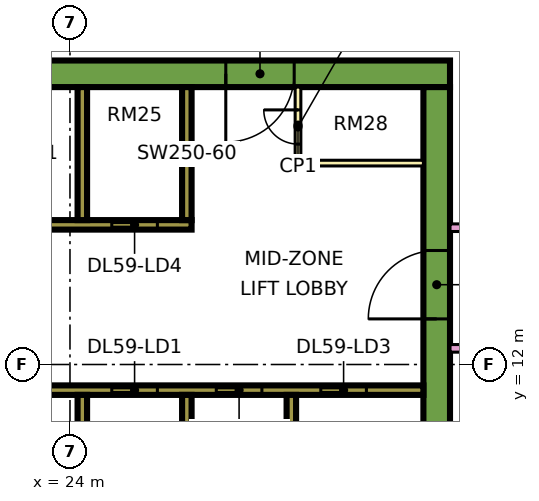
"""IFC4 building model, lengths in metres.
Left out: names, types, materials, properties, quantities, classifications, styles, units other than length and angle.
Written with IfcOpenShell. Run it as: python <this file> out.ifc"""

import sys

from ifc_helpers import new_model, si_unit, direction, frame, frame_2d, origin, place, context, subcontext, project, spatial, rectangle, extrude, element, fill, save


model = new_model("IFC4")
c1 = context("Model", 3, precision=1e-05, world=origin(), true_north=direction((0.0, 1.0)))
c2 = subcontext(c1, "Body", "Model", "MODEL_VIEW")
j1 = project(units=[si_unit("LENGTHUNIT", "METRE"), si_unit("PLANEANGLEUNIT", "RADIAN")], contexts=[c1])
p1 = place(None, origin())
s1 = spatial("IfcSite", under=j1, at=p1, CompositionType="ELEMENT")
p2 = place(p1, origin())
s2 = spatial("IfcBuilding", under=s1, at=p2, CompositionType="ELEMENT")
p3 = place(p2, frame((0.0, 0.0, 249.15)))
s3 = spatial("IfcBuildingStorey", under=s2, at=p3, CompositionType="ELEMENT", Elevation=249.15)
p4 = place(p3, frame((9.0, 19.65, 0.0), z_axis=(0.0, 0.0, 1.0), x_axis=(1.0, 0.0, 0.0)))
e1 = element("IfcWall", 1, at=p4, inside=s3, PredefinedType="SHEAR", context=c2, shape_type="SweptSolid", body=[
    extrude(rectangle(XDim=25.0, YDim=0.7, at=frame_2d((12.5, 0.0))), origin(), (0.0, 0.0, 1.0), 3.75),
])
p5 = place(p4, frame((19.1, 0.0, 0.0)))
e2 = element("IfcOpeningElement", 2, at=p5, cuts=e1, PredefinedType="OPENING", context=c2, shape_type="SweptSolid", body=[
    extrude(rectangle(XDim=1.8, YDim=2.4, at=frame_2d((0.9, 1.2))), frame((0.0, 0.36, 0.0), z_axis=(0.0, -1.0, 0.0), x_axis=(1.0, 0.0, 0.0)), (0.0, 0.0, 1.0), 0.72),
])
p6 = place(p3, frame((33.65, 7.7, 0.0), z_axis=(0.0, 0.0, 1.0), x_axis=(0.0, 1.0, 0.0)))
e3 = element("IfcWall", 3, at=p6, inside=s3, PredefinedType="SHEAR", context=c2, shape_type="SweptSolid", body=[
    extrude(rectangle(XDim=11.6, YDim=0.7, at=frame_2d((5.8, 0.0))), origin(), (0.0, 0.0, 1.0), 3.75),
])
p7 = place(p6, frame((5.5, 0.0, 0.0)))
e4 = element("IfcOpeningElement", 4, at=p7, cuts=e3, PredefinedType="OPENING", context=c2, shape_type="SweptSolid", body=[
    extrude(rectangle(XDim=1.8, YDim=2.4, at=frame_2d((0.9, 1.2))), frame((0.0, 0.36, 0.0), z_axis=(0.0, -1.0, 0.0), x_axis=(1.0, 0.0, 0.0)), (0.0, 0.0, 1.0), 0.72),
])
p8 = place(p3, frame((13.45, 11.325, 0.0), z_axis=(0.0, 0.0, 1.0), x_axis=(1.0, 0.0, 0.0)))
e5 = element("IfcWall", 5, at=p8, inside=s3, PredefinedType="SHEAR", context=c2, shape_type="SweptSolid", body=[
    extrude(rectangle(XDim=19.85, YDim=0.25, at=frame_2d((9.925, 0.0))), origin(), (0.0, 0.0, 1.0), 3.75),
])
p9 = place(p8, frame((11.65, 0.0, 0.0)))
e6 = element("IfcOpeningElement", 6, at=p9, cuts=e5, PredefinedType="OPENING", context=c2, shape_type="SweptSolid", body=[
    extrude(rectangle(XDim=1.2, YDim=2.2, at=frame_2d((0.6, 1.1))), frame((0.0, 0.135, 0.0), z_axis=(0.0, -1.0, 0.0), x_axis=(1.0, 0.0, 0.0)), (0.0, 0.0, 1.0), 0.27),
])
p10 = place(p8, frame((14.4, 0.0, 0.0)))
e7 = element("IfcOpeningElement", 7, at=p10, cuts=e5, PredefinedType="OPENING", context=c2, shape_type="SweptSolid", body=[
    extrude(rectangle(XDim=1.2, YDim=2.2, at=frame_2d((0.6, 1.1))), frame((0.0, 0.135, 0.0), z_axis=(0.0, -1.0, 0.0), x_axis=(1.0, 0.0, 0.0)), (0.0, 0.0, 1.0), 0.27),
])
p11 = place(p8, frame((17.15, 0.0, 0.0)))
e8 = element("IfcOpeningElement", 8, at=p11, cuts=e5, PredefinedType="OPENING", context=c2, shape_type="SweptSolid", body=[
    extrude(rectangle(XDim=1.2, YDim=2.2, at=frame_2d((0.6, 1.1))), frame((0.0, 0.135, 0.0), z_axis=(0.0, -1.0, 0.0), x_axis=(1.0, 0.0, 0.0)), (0.0, 0.0, 1.0), 0.27),
])
p12 = place(p8, frame((2.8, 0.0, 0.0)))
e9 = element("IfcOpeningElement", 9, at=p12, cuts=e5, PredefinedType="OPENING", context=c2, shape_type="SweptSolid", body=[
    extrude(rectangle(XDim=0.9, YDim=2.1, at=frame_2d((0.45, 1.05))), frame((0.0, 0.135, 0.0), z_axis=(0.0, -1.0, 0.0), x_axis=(1.0, 0.0, 0.0)), (0.0, 0.0, 1.0), 0.27),
])
p13 = place(p8, frame((8.175, 0.0, 0.0)))
e10 = element("IfcOpeningElement", 10, at=p13, cuts=e5, PredefinedType="OPENING", context=c2, shape_type="SweptSolid", body=[
    extrude(rectangle(XDim=0.9, YDim=2.1, at=frame_2d((0.45, 1.05))), frame((0.0, 0.135, 0.0), z_axis=(0.0, -1.0, 0.0), x_axis=(1.0, 0.0, 0.0)), (0.0, 0.0, 1.0), 0.27),
])
p14 = place(p3, frame((13.45, 15.675, 0.0), z_axis=(0.0, 0.0, 1.0), x_axis=(1.0, 0.0, 0.0)))
e11 = element("IfcWall", 11, at=p14, inside=s3, PredefinedType="SHEAR", context=c2, shape_type="SweptSolid", body=[
    extrude(rectangle(XDim=13.75, YDim=0.25, at=frame_2d((6.875, 0.0))), origin(), (0.0, 0.0, 1.0), 3.75),
])
p15 = place(p14, frame((11.65, 0.0, 0.0)))
e12 = element("IfcOpeningElement", 12, at=p15, cuts=e11, PredefinedType="OPENING", context=c2, shape_type="SweptSolid", body=[
    extrude(rectangle(XDim=1.2, YDim=2.2, at=frame_2d((0.6, 1.1))), frame((0.0, 0.135, 0.0), z_axis=(0.0, -1.0, 0.0), x_axis=(1.0, 0.0, 0.0)), (0.0, 0.0, 1.0), 0.27),
])
for number, where, z_axis, x_axis in (
    (13, (24.325, 7.7, 0.0), (0.0, 0.0, 1.0), (0.0, 1.0, 0.0)),
    (14, (27.075, 7.7, 0.0), (0.0, 0.0, 1.0), (0.0, 1.0, 0.0)),
    (15, (29.825, 7.7, 0.0), (0.0, 0.0, 1.0), (0.0, 1.0, 0.0)),
    (16, (24.325, 15.8, 0.0), (0.0, 0.0, 1.0), (0.0, 1.0, 0.0)),
    (17, (27.075, 15.8, 0.0), (0.0, 0.0, 1.0), (0.0, 1.0, 0.0)),
):
    element("IfcWall", number, at=place(p3, frame(where, z_axis=z_axis, x_axis=x_axis)), inside=s3, PredefinedType="SHEAR", context=c2, shape_type="SweptSolid", body=[
        extrude(rectangle(XDim=3.5, YDim=0.25, at=frame_2d((1.75, 0.0))), origin(), (0.0, 0.0, 1.0), 3.75),
    ])
p16 = place(p3, frame((30.0, 17.3, 0.0), z_axis=(0.0, 0.0, 1.0), x_axis=(0.0, 1.0, 0.0)))
e18 = element("IfcWall", 18, at=p16, inside=s3, PredefinedType="PARTITIONING", context=c2, shape_type="SweptSolid", body=[
    extrude(rectangle(XDim=2.0, YDim=0.15, at=frame_2d((1.0, 0.0))), origin(), (0.0, 0.0, 1.0), 3.35),
])
p17 = place(p16, frame((0.5, 0.0, 0.0)))
e19 = element("IfcOpeningElement", 19, at=p17, cuts=e18, PredefinedType="OPENING", context=c2, shape_type="SweptSolid", body=[
    extrude(rectangle(XDim=0.9, YDim=2.1, at=frame_2d((0.45, 1.05))), frame((0.0, 0.085, 0.0), z_axis=(0.0, -1.0, 0.0), x_axis=(1.0, 0.0, 0.0)), (0.0, 0.0, 1.0), 0.17),
])
p18 = place(p3, frame((30.0, 17.3, 0.0), z_axis=(0.0, 0.0, 1.0), x_axis=(1.0, 0.0, 0.0)))
e20 = element("IfcWall", 20, at=p18, inside=s3, PredefinedType="PARTITIONING", context=c2, shape_type="SweptSolid", body=[
    extrude(rectangle(XDim=3.3, YDim=0.15, at=frame_2d((1.65, 0.0))), origin(), (0.0, 0.0, 1.0), 3.35),
])
p19 = place(p3, frame((34.0, 12.425, 0.0), z_axis=(0.0, 0.0, 1.0), x_axis=(1.0, 0.0, 0.0)))
e21 = element("IfcWall", 21, at=p19, inside=s3, PredefinedType="PARTITIONING", context=c2, shape_type="SweptSolid", body=[
    extrude(rectangle(XDim=2.426, YDim=0.2, at=frame_2d((1.213, 0.0))), origin(), (0.0, 0.0, 1.0), 3.35),
])
p20 = place(p3, frame((34.0, 15.6, 0.0), z_axis=(0.0, 0.0, 1.0), x_axis=(1.0, 0.0, 0.0)))
e22 = element("IfcWall", 22, at=p20, inside=s3, PredefinedType="PARTITIONING", context=c2, shape_type="SweptSolid", body=[
    extrude(rectangle(XDim=10.35, YDim=0.2, at=frame_2d((5.175, 0.0))), origin(), (0.0, 0.0, 1.0), 3.35),
])
p21 = place(p20, frame((5.6, 0.0, 0.0)))
e23 = element("IfcOpeningElement", 23, at=p21, cuts=e22, PredefinedType="OPENING", context=c2, shape_type="SweptSolid", body=[
    extrude(rectangle(XDim=1.0, YDim=2.1, at=frame_2d((0.5, 1.05))), frame((0.0, 0.11, 0.0), z_axis=(0.0, -1.0, 0.0), x_axis=(1.0, 0.0, 0.0)), (0.0, 0.0, 1.0), 0.22),
])
p22 = place(p20, frame((0.45, 0.0, 0.0)))
e24 = element("IfcOpeningElement", 24, at=p22, cuts=e22, PredefinedType="OPENING", context=c2, shape_type="SweptSolid", body=[
    extrude(rectangle(XDim=1.2, YDim=2.1, at=frame_2d((0.6, 1.05))), frame((0.0, 0.11, 0.0), z_axis=(0.0, -1.0, 0.0), x_axis=(1.0, 0.0, 0.0)), (0.0, 0.0, 1.0), 0.22),
])
p23 = place(p9, origin())
e25 = element("IfcDoor", 25, at=p23, inside=s3, OperationType="DOUBLE_DOOR_SLIDING", PredefinedType="DOOR", context=c2, shape_type="SweptSolid", body=[
    extrude(rectangle(XDim=1.2, YDim=2.2, at=frame_2d((0.6, 1.1))), frame((0.0, 0.025, 0.0), z_axis=(0.0, -1.0, 0.0), x_axis=(1.0, 0.0, 0.0)), (0.0, 0.0, 1.0), 0.05),
])
fill(e6, e25)
p24 = place(p10, origin())
e26 = element("IfcDoor", 26, at=p24, inside=s3, OperationType="DOUBLE_DOOR_SLIDING", PredefinedType="DOOR", context=c2, shape_type="SweptSolid", body=[
    extrude(rectangle(XDim=1.2, YDim=2.2, at=frame_2d((0.6, 1.1))), frame((0.0, 0.025, 0.0), z_axis=(0.0, -1.0, 0.0), x_axis=(1.0, 0.0, 0.0)), (0.0, 0.0, 1.0), 0.05),
])
fill(e7, e26)
p25 = place(p11, origin())
e27 = element("IfcDoor", 27, at=p25, inside=s3, OperationType="DOUBLE_DOOR_SLIDING", PredefinedType="DOOR", context=c2, shape_type="SweptSolid", body=[
    extrude(rectangle(XDim=1.2, YDim=2.2, at=frame_2d((0.6, 1.1))), frame((0.0, 0.025, 0.0), z_axis=(0.0, -1.0, 0.0), x_axis=(1.0, 0.0, 0.0)), (0.0, 0.0, 1.0), 0.05),
])
fill(e8, e27)
p26 = place(p15, origin())
e28 = element("IfcDoor", 28, at=p26, inside=s3, OperationType="DOUBLE_DOOR_SLIDING", PredefinedType="DOOR", context=c2, shape_type="SweptSolid", body=[
    extrude(rectangle(XDim=1.2, YDim=2.2, at=frame_2d((0.6, 1.1))), frame((0.0, 0.025, 0.0), z_axis=(0.0, -1.0, 0.0), x_axis=(1.0, 0.0, 0.0)), (0.0, 0.0, 1.0), 0.05),
])
fill(e12, e28)
p27 = place(p7, origin())
e29 = element("IfcDoor", 29, at=p27, inside=s3, OperationType="DOUBLE_DOOR_SINGLE_SWING", PredefinedType="DOOR", context=c2, shape_type="SweptSolid", body=[
    extrude(rectangle(XDim=1.8, YDim=2.4, at=frame_2d((0.9, 1.2))), frame((0.0, 0.025, 0.0), z_axis=(0.0, -1.0, 0.0), x_axis=(1.0, 0.0, 0.0)), (0.0, 0.0, 1.0), 0.05),
])
fill(e4, e29)
p28 = place(p5, frame((1.8, 0.0, 0.0), z_axis=(0.0, 0.0, 1.0), x_axis=(-1.0, 0.0, 0.0)))
e30 = element("IfcDoor", 30, at=p28, inside=s3, OperationType="DOUBLE_DOOR_SINGLE_SWING", PredefinedType="DOOR", context=c2, shape_type="SweptSolid", body=[
    extrude(rectangle(XDim=1.8, YDim=2.4, at=frame_2d((0.9, 1.2))), frame((0.0, 0.025, 0.0), z_axis=(0.0, -1.0, 0.0), x_axis=(1.0, 0.0, 0.0)), (0.0, 0.0, 1.0), 0.05),
])
fill(e2, e30)
p29 = place(p17, frame((0.9, 0.0, 0.0), z_axis=(0.0, 0.0, 1.0), x_axis=(-1.0, 0.0, 0.0)))
e31 = element("IfcDoor", 31, at=p29, inside=s3, OperationType="SINGLE_SWING_RIGHT", PredefinedType="DOOR", context=c2, shape_type="SweptSolid", body=[
    extrude(rectangle(XDim=0.9, YDim=2.1, at=frame_2d((0.45, 1.05))), frame((0.0, 0.025, 0.0), z_axis=(0.0, -1.0, 0.0), x_axis=(1.0, 0.0, 0.0)), (0.0, 0.0, 1.0), 0.05),
])
fill(e19, e31)
save(model, sys.argv[1])
